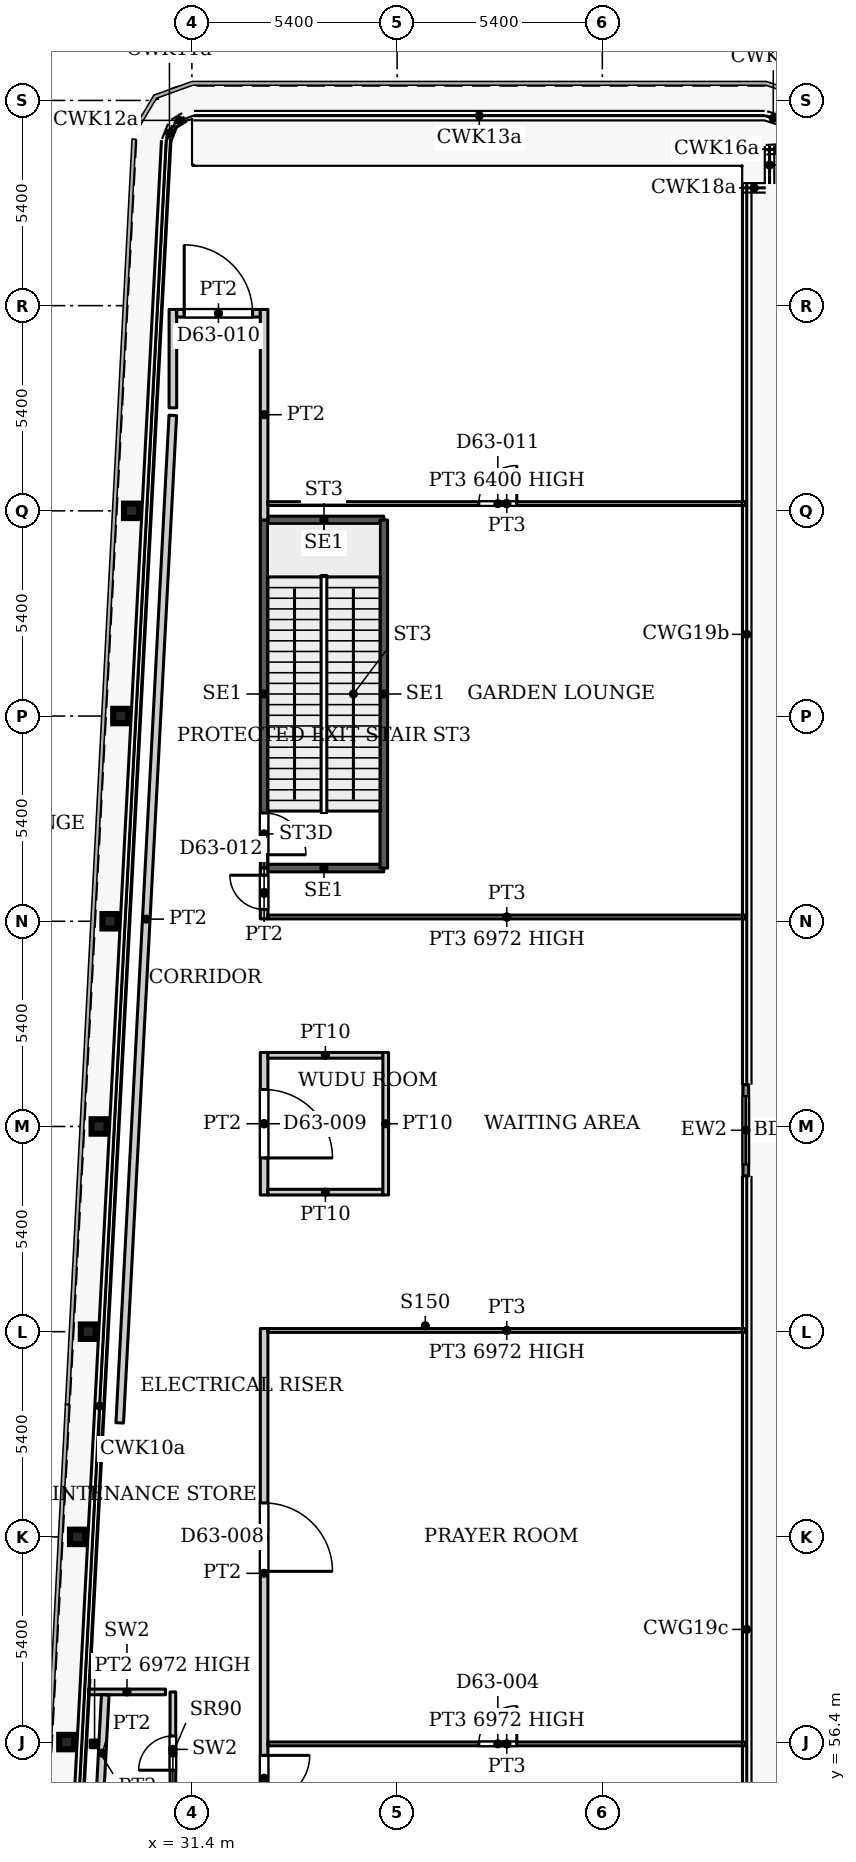
"""IFC4 building model, lengths in metres.
Left out: names, types, materials, properties, quantities, classifications, styles, units other than length and angle.
Written with IfcOpenShell. Run it as: python <this file> out.ifc"""

import sys

from ifc_helpers import new_model, si_unit, direction, frame, frame_2d, origin, origin_2d, place, context, subcontext, project, spatial, rectangle, i_section, extrude, source, transform, mapped, element, fill, save


model = new_model("IFC4")
c1 = context("Model", 3, precision=1e-05, world=origin(), true_north=direction((0.0, 1.0)))
c2 = subcontext(c1, "Body", "Model", "MODEL_VIEW")
j1 = project(units=[si_unit("LENGTHUNIT", "METRE"), si_unit("PLANEANGLEUNIT", "RADIAN")], contexts=[c1])
p1 = place(None, origin())
s1 = spatial("IfcSite", under=j1, at=p1, CompositionType="ELEMENT")
p2 = place(p1, origin())
s2 = spatial("IfcBuilding", under=s1, at=p2, CompositionType="ELEMENT")
p3 = place(p2, frame((0.0, 0.0, 266.9)))
s3 = spatial("IfcBuildingStorey", under=s2, at=p3, CompositionType="ELEMENT", Elevation=266.9)
for number, where, z_axis, x_axis in (
    (1, (28.106, 56.4, 0.0), (0.0, 0.0, 1.0), (1.0, 0.0, 0.0)),
    (2, (28.39, 61.8, 0.0), (0.0, 0.0, 1.0), (1.0, 0.0, 0.0)),
    (3, (28.674, 67.2, 0.0), (0.0, 0.0, 1.0), (1.0, 0.0, 0.0)),
    (4, (28.958, 72.6, 0.0), (0.0, 0.0, 1.0), (1.0, 0.0, 0.0)),
    (5, (29.243, 78.0, 0.0), (0.0, 0.0, 1.0), (1.0, 0.0, 0.0)),
    (6, (29.527, 83.4, 0.0), (0.0, 0.0, 1.0), (1.0, 0.0, 0.0)),
    (7, (29.811, 88.8, 0.0), (0.0, 0.0, 1.0), (1.0, 0.0, 0.0)),
):
    element("IfcColumn", number, at=place(p3, frame(where, z_axis=z_axis, x_axis=x_axis)), inside=s3, PredefinedType="COLUMN", context=c2, shape_type="SweptSolid", body=[
        extrude(i_section(OverallWidth=0.395, OverallDepth=0.38, WebThickness=0.019, FlangeThickness=0.03, FilletRadius=0.011, at=origin_2d()), origin(), (0.0, 0.0, 1.0), 7.8),
    ])
p4 = place(p3, frame((45.975, 73.7, 0.0), z_axis=(0.0, 0.0, 1.0), x_axis=(0.0, -1.0, 0.0)))
e8 = element("IfcWall", 8, at=p4, inside=s3, PredefinedType="SOLIDWALL", context=c2, shape_type="SweptSolid", body=[
    extrude(rectangle(XDim=2.4, YDim=0.15, at=frame_2d((1.2, 0.0))), origin(), (0.0, 0.0, 1.0), 7.65),
])
p5 = place(p4, frame((0.3, 0.0, 0.0)))
e9 = element("IfcOpeningElement", 9, at=p5, cuts=e8, PredefinedType="OPENING", context=c2, shape_type="SweptSolid", body=[
    extrude(rectangle(XDim=1.8, YDim=2.4, at=frame_2d((0.9, 1.2))), frame((0.0, 0.085, 0.0), z_axis=(0.0, -1.0, 0.0), x_axis=(1.0, 0.0, 0.0)), (0.0, 0.0, 1.0), 0.17),
])
for number, where, z_axis, x_axis in (
    (10, (33.3, 79.4, 0.0), (0.0, 0.0, 1.0), (1.0, 0.0, 0.0)),
    (11, (33.3, 88.56, 0.0), (0.0, 0.0, 1.0), (1.0, 0.0, 0.0)),
):
    element("IfcWall", number, at=place(p3, frame(where, z_axis=z_axis, x_axis=x_axis)), inside=s3, PredefinedType="SHEAR", context=c2, shape_type="SweptSolid", body=[
        extrude(rectangle(XDim=3.15, YDim=0.2, at=frame_2d((1.575, 0.0))), origin(), (0.0, 0.0, 1.0), 7.8),
    ])
p6 = place(p3, frame((33.3, 79.4, 0.0), z_axis=(0.0, 0.0, 1.0), x_axis=(0.0, 1.0, 0.0)))
e12 = element("IfcWall", 12, at=p6, inside=s3, PredefinedType="SHEAR", context=c2, shape_type="SweptSolid", body=[
    extrude(rectangle(XDim=9.16, YDim=0.2, at=frame_2d((4.58, 0.0))), origin(), (0.0, 0.0, 1.0), 7.8),
])
p7 = place(p6, frame((0.35, 0.0, 0.0)))
e13 = element("IfcOpeningElement", 13, at=p7, cuts=e12, PredefinedType="OPENING", context=c2, shape_type="SweptSolid", body=[
    extrude(rectangle(XDim=1.1, YDim=2.2, at=frame_2d((0.55, 1.1))), frame((0.0, 0.11, 0.0), z_axis=(0.0, -1.0, 0.0), x_axis=(1.0, 0.0, 0.0)), (0.0, 0.0, 1.0), 0.22),
])
p8 = place(p3, frame((36.45, 79.4, 0.0), z_axis=(0.0, 0.0, 1.0), x_axis=(0.0, 1.0, 0.0)))
e14 = element("IfcWall", 14, at=p8, inside=s3, PredefinedType="SHEAR", context=c2, shape_type="SweptSolid", body=[
    extrude(rectangle(XDim=9.16, YDim=0.2, at=frame_2d((4.58, 0.0))), origin(), (0.0, 0.0, 1.0), 7.8),
])
p9 = place(p3, frame((30.9, 54.695, 0.0), z_axis=(0.0, 0.0, 1.0), x_axis=(0.0, 1.0, 0.0)))
e15 = element("IfcWall", 15, at=p9, inside=s3, PredefinedType="PARTITIONING", context=c2, shape_type="SweptSolid", body=[
    extrude(rectangle(XDim=3.025, YDim=0.15, at=frame_2d((1.512, 0.0))), origin(), (0.0, 0.0, 1.0), 6.972),
])
p10 = place(p9, frame((0.965, 0.0, 0.0)))
e16 = element("IfcOpeningElement", 16, at=p10, cuts=e15, PredefinedType="OPENING", context=c2, shape_type="SweptSolid", body=[
    extrude(rectangle(XDim=0.9, YDim=2.2, at=frame_2d((0.45, 1.1))), frame((0.0, 0.085, 0.0), z_axis=(0.0, -1.0, 0.0), x_axis=(1.0, 0.0, 0.0)), (0.0, 0.0, 1.0), 0.17),
])
p11 = place(p3, frame((28.678, 57.72, 0.0), z_axis=(0.0, 0.0, 1.0), x_axis=(1.0, 0.0, 0.0)))
e17 = element("IfcWall", 17, at=p11, inside=s3, PredefinedType="PARTITIONING", context=c2, shape_type="SweptSolid", body=[
    extrude(rectangle(XDim=2.027, YDim=0.15, at=frame_2d((1.014, 0.0))), origin(), (0.0, 0.0, 1.0), 7.8),
])
p12 = place(p3, frame((28.724, 56.353, 0.0), z_axis=(0.0, 0.0, 1.0), x_axis=(1.0, 0.0, 0.0)))
e18 = element("IfcWall", 18, at=p12, inside=s3, PredefinedType="PARTITIONING", context=c2, shape_type="SweptSolid", body=[
    extrude(rectangle(XDim=0.23, YDim=0.2, at=frame_2d((0.115, 0.0))), origin(), (0.0, 0.0, 1.0), 6.972),
])
p13 = place(p3, frame((28.96, 54.574, 0.0), z_axis=(0.0, 0.0, 1.0), x_axis=(0.052145785312, 0.998639483034, 0.0)))
e19 = element("IfcWall", 19, at=p13, inside=s3, PredefinedType="PARTITIONING", context=c2, shape_type="SweptSolid", body=[
    extrude(rectangle(XDim=3.071, YDim=0.2, at=frame_2d((1.536, 0.0))), origin(), (0.0, 0.0, 1.0), 7.5),
])
p14 = place(p3, frame((29.501, 64.8, 0.0), z_axis=(0.0, 0.0, 1.0), x_axis=(0.052619165502, 0.998614652117, 0.0)))
e20 = element("IfcWall", 20, at=p14, inside=s3, PredefinedType="PARTITIONING", context=c2, shape_type="SweptSolid", body=[
    extrude(rectangle(XDim=26.549, YDim=0.2, at=frame_2d((13.274, 0.0))), origin(), (0.0, 0.0, 1.0), 7.5),
])
p15 = place(p3, frame((30.9, 91.512, 0.0), z_axis=(0.0, 0.0, 1.0), x_axis=(0.0, 1.0, 0.0)))
e21 = element("IfcWall", 21, at=p15, inside=s3, PredefinedType="PARTITIONING", context=c2, shape_type="SweptSolid", body=[
    extrude(rectangle(XDim=2.588, YDim=0.2, at=frame_2d((1.294, 0.0))), origin(), (0.0, 0.0, 1.0), 7.5),
])
p16 = place(p3, frame((31.0, 94.0, 0.0), z_axis=(0.0, 0.0, 1.0), x_axis=(1.0, 0.0, 0.0)))
e22 = element("IfcWall", 22, at=p16, inside=s3, PredefinedType="PARTITIONING", context=c2, shape_type="SweptSolid", body=[
    extrude(rectangle(XDim=2.2, YDim=0.2, at=frame_2d((1.1, 0.0))), origin(), (0.0, 0.0, 1.0), 7.5),
])
p17 = place(p16, frame((0.198, 0.0, 0.0)))
e23 = element("IfcOpeningElement", 23, at=p17, cuts=e22, PredefinedType="OPENING", context=c2, shape_type="SweptSolid", body=[
    extrude(rectangle(XDim=1.8, YDim=2.1, at=frame_2d((0.9, 1.05))), frame((0.0, 0.11, 0.0), z_axis=(0.0, -1.0, 0.0), x_axis=(1.0, 0.0, 0.0)), (0.0, 0.0, 1.0), 0.22),
])
p18 = place(p3, frame((33.3, 54.4, 0.0), z_axis=(0.0, 0.0, 1.0), x_axis=(0.0, 1.0, 0.0)))
e24 = element("IfcWall", 24, at=p18, inside=s3, PredefinedType="PARTITIONING", context=c2, shape_type="SweptSolid", body=[
    extrude(rectangle(XDim=12.882, YDim=0.2, at=frame_2d((6.441, 0.0))), origin(), (0.0, 0.0, 1.0), 7.5),
])
p19 = place(p18, frame((0.45, 0.0, 0.0)))
e25 = element("IfcOpeningElement", 25, at=p19, cuts=e24, PredefinedType="OPENING", context=c2, shape_type="SweptSolid", body=[
    extrude(rectangle(XDim=1.2, YDim=2.1, at=frame_2d((0.6, 1.05))), frame((0.0, 0.11, 0.0), z_axis=(0.0, -1.0, 0.0), x_axis=(1.0, 0.0, 0.0)), (0.0, 0.0, 1.0), 0.22),
])
p20 = place(p18, frame((6.493, 0.0, 0.0)))
e26 = element("IfcOpeningElement", 26, at=p20, cuts=e24, PredefinedType="OPENING", context=c2, shape_type="SweptSolid", body=[
    extrude(rectangle(XDim=1.8, YDim=2.1, at=frame_2d((0.9, 1.05))), frame((0.0, 0.11, 0.0), z_axis=(0.0, -1.0, 0.0), x_axis=(1.0, 0.0, 0.0)), (0.0, 0.0, 1.0), 0.22),
])
p21 = place(p3, frame((33.3, 70.797, 0.0), z_axis=(0.0, 0.0, 1.0), x_axis=(0.0, 1.0, 0.0)))
e27 = element("IfcWall", 27, at=p21, inside=s3, PredefinedType="PARTITIONING", context=c2, shape_type="SweptSolid", body=[
    extrude(rectangle(XDim=3.75, YDim=0.2, at=frame_2d((1.875, 0.0))), origin(), (0.0, 0.0, 1.0), 7.5),
])
p22 = place(p21, frame((0.975, 0.0, 0.0)))
e28 = element("IfcOpeningElement", 28, at=p22, cuts=e27, PredefinedType="OPENING", context=c2, shape_type="SweptSolid", body=[
    extrude(rectangle(XDim=1.8, YDim=2.1, at=frame_2d((0.9, 1.05))), frame((0.0, 0.11, 0.0), z_axis=(0.0, -1.0, 0.0), x_axis=(1.0, 0.0, 0.0)), (0.0, 0.0, 1.0), 0.22),
])
p23 = place(p3, frame((33.3, 78.062, 0.0), z_axis=(0.0, 0.0, 1.0), x_axis=(0.0, 1.0, 0.0)))
e29 = element("IfcWall", 29, at=p23, inside=s3, PredefinedType="PARTITIONING", context=c2, shape_type="SweptSolid", body=[
    extrude(rectangle(XDim=1.338, YDim=0.2, at=frame_2d((0.669, 0.0))), origin(), (0.0, 0.0, 1.0), 7.5),
])
p24 = place(p23, frame((0.25, 0.0, 0.0)))
e30 = element("IfcOpeningElement", 30, at=p24, cuts=e29, PredefinedType="OPENING", context=c2, shape_type="SweptSolid", body=[
    extrude(rectangle(XDim=0.9, YDim=2.1, at=frame_2d((0.45, 1.05))), frame((0.0, 0.11, 0.0), z_axis=(0.0, -1.0, 0.0), x_axis=(1.0, 0.0, 0.0)), (0.0, 0.0, 1.0), 0.22),
])
p25 = place(p3, frame((33.3, 88.56, 0.0), z_axis=(0.0, 0.0, 1.0), x_axis=(0.0, 1.0, 0.0)))
e31 = element("IfcWall", 31, at=p25, inside=s3, PredefinedType="PARTITIONING", context=c2, shape_type="SweptSolid", body=[
    extrude(rectangle(XDim=5.54, YDim=0.2, at=frame_2d((2.77, 0.0))), origin(), (0.0, 0.0, 1.0), 7.5),
])
p26 = place(p3, frame((33.4, 56.353, 0.0), z_axis=(0.0, 0.0, 1.0), x_axis=(1.0, 0.0, 0.0)))
e32 = element("IfcWall", 32, at=p26, inside=s3, PredefinedType="PARTITIONING", context=c2, shape_type="SweptSolid", body=[
    extrude(rectangle(XDim=12.57, YDim=0.1, at=frame_2d((6.285, 0.0))), origin(), (0.0, 0.0, 1.0), 6.972),
])
p27 = place(p26, frame((5.55, 0.0, 0.0)))
e33 = element("IfcOpeningElement", 33, at=p27, cuts=e32, PredefinedType="OPENING", context=c2, shape_type="SweptSolid", body=[
    extrude(rectangle(XDim=1.0, YDim=2.1, at=frame_2d((0.5, 1.05))), frame((0.0, 0.06, 0.0), z_axis=(0.0, -1.0, 0.0), x_axis=(1.0, 0.0, 0.0)), (0.0, 0.0, 1.0), 0.12),
])
p28 = place(p3, frame((33.4, 67.232, 0.0), z_axis=(0.0, 0.0, 1.0), x_axis=(1.0, 0.0, 0.0)))
e34 = element("IfcWall", 34, at=p28, inside=s3, PredefinedType="PARTITIONING", context=c2, shape_type="SweptSolid", body=[
    extrude(rectangle(XDim=12.57, YDim=0.1, at=frame_2d((6.285, 0.0))), origin(), (0.0, 0.0, 1.0), 6.972),
])
for number, where, z_axis, x_axis in (
    (35, (33.4, 70.872, 0.0), (0.0, 0.0, 1.0), (1.0, 0.0, 0.0)),
    (36, (33.4, 74.472, 0.0), (0.0, 0.0, 1.0), (1.0, 0.0, 0.0)),
):
    element("IfcWall", number, at=place(p3, frame(where, z_axis=z_axis, x_axis=x_axis)), inside=s3, PredefinedType="PARTITIONING", context=c2, shape_type="SweptSolid", body=[
        extrude(rectangle(XDim=3.025, YDim=0.15, at=frame_2d((1.513, 0.0))), origin(), (0.0, 0.0, 1.0), 7.5),
    ])
p29 = place(p3, frame((33.4, 78.112, 0.0), z_axis=(0.0, 0.0, 1.0), x_axis=(1.0, 0.0, 0.0)))
e37 = element("IfcWall", 37, at=p29, inside=s3, PredefinedType="PARTITIONING", context=c2, shape_type="SweptSolid", body=[
    extrude(rectangle(XDim=12.57, YDim=0.1, at=frame_2d((6.285, 0.0))), origin(), (0.0, 0.0, 1.0), 6.972),
])
p30 = place(p3, frame((33.4, 88.991, 0.0), z_axis=(0.0, 0.0, 1.0), x_axis=(1.0, 0.0, 0.0)))
e38 = element("IfcWall", 38, at=p30, inside=s3, PredefinedType="PARTITIONING", context=c2, shape_type="SweptSolid", body=[
    extrude(rectangle(XDim=12.57, YDim=0.1, at=frame_2d((6.285, 0.0))), origin(), (0.0, 0.0, 1.0), 6.4),
])
p31 = place(p30, frame((5.55, 0.0, 0.0)))
e39 = element("IfcOpeningElement", 39, at=p31, cuts=e38, PredefinedType="OPENING", context=c2, shape_type="SweptSolid", body=[
    extrude(rectangle(XDim=1.0, YDim=2.1, at=frame_2d((0.5, 1.05))), frame((0.0, 0.06, 0.0), z_axis=(0.0, -1.0, 0.0), x_axis=(1.0, 0.0, 0.0)), (0.0, 0.0, 1.0), 0.12),
])
p32 = place(p3, frame((36.5, 70.797, 0.0), z_axis=(0.0, 0.0, 1.0), x_axis=(0.0, 1.0, 0.0)))
e40 = element("IfcWall", 40, at=p32, inside=s3, PredefinedType="PARTITIONING", context=c2, shape_type="SweptSolid", body=[
    extrude(rectangle(XDim=3.75, YDim=0.15, at=frame_2d((1.875, 0.0))), origin(), (0.0, 0.0, 1.0), 7.5),
])
m1 = source(origin(), c2, "Body", "SweptSolid", [
    extrude(rectangle(XDim=1.8, YDim=2.4, at=frame_2d((0.9, 1.2))), frame((0.0, 0.025, 0.0), z_axis=(0.0, -1.0, 0.0), x_axis=(1.0, 0.0, 0.0)), (0.0, 0.0, 1.0), 0.05),
])
p33 = place(p5, origin())
e41 = element("IfcDoor", 41, at=p33, inside=s3, OperationType="SLIDING_TO_LEFT", PredefinedType="DOOR", context=c2, shape_type="MappedRepresentation", body=[
    mapped(m1, transform((0.0, 0.0, 0.0), x_axis=(1.0, 0.0, 0.0), y_axis=(0.0, 1.0, 0.0), z_axis=(0.0, 0.0, 1.0), scale=1.0)),
])
fill(e9, e41)
m2 = source(origin(), c2, "Body", "SweptSolid", [
    extrude(rectangle(XDim=0.9, YDim=2.2, at=frame_2d((0.45, 1.1))), frame((0.0, 0.025, 0.0), z_axis=(0.0, -1.0, 0.0), x_axis=(1.0, 0.0, 0.0)), (0.0, 0.0, 1.0), 0.05),
])
p34 = place(p10, origin())
e42 = element("IfcDoor", 42, at=p34, inside=s3, OperationType="SINGLE_SWING_LEFT", PredefinedType="DOOR", context=c2, shape_type="MappedRepresentation", body=[
    mapped(m2, transform((0.0, 0.0, 0.0), x_axis=(1.0, 0.0, 0.0), y_axis=(0.0, 1.0, 0.0), z_axis=(0.0, 0.0, 1.0), scale=1.0)),
])
fill(e16, e42)
m3 = source(origin(), c2, "Body", "SweptSolid", [
    extrude(rectangle(XDim=1.1, YDim=2.2, at=frame_2d((0.55, 1.1))), frame((0.0, 0.025, 0.0), z_axis=(0.0, -1.0, 0.0), x_axis=(1.0, 0.0, 0.0)), (0.0, 0.0, 1.0), 0.05),
])
p35 = place(p7, origin())
e43 = element("IfcDoor", 43, at=p35, inside=s3, OperationType="SINGLE_SWING_RIGHT", PredefinedType="DOOR", context=c2, shape_type="MappedRepresentation", body=[
    mapped(m3, transform((0.0, 0.0, 0.0), x_axis=(1.0, 0.0, 0.0), y_axis=(0.0, 1.0, 0.0), z_axis=(0.0, 0.0, 1.0), scale=1.0)),
])
fill(e13, e43)
m4 = source(origin(), c2, "Body", "SweptSolid", [
    extrude(rectangle(XDim=1.0, YDim=2.1, at=frame_2d((0.5, 1.05))), frame((0.0, 0.025, 0.0), z_axis=(0.0, -1.0, 0.0), x_axis=(1.0, 0.0, 0.0)), (0.0, 0.0, 1.0), 0.05),
])
p36 = place(p27, origin())
e44 = element("IfcDoor", 44, at=p36, inside=s3, OperationType="SINGLE_SWING_LEFT", PredefinedType="DOOR", context=c2, shape_type="MappedRepresentation", body=[
    mapped(m4, transform((0.0, 0.0, 0.0), x_axis=(1.0, 0.0, 0.0), y_axis=(0.0, 1.0, 0.0), z_axis=(0.0, 0.0, 1.0), scale=1.0)),
])
fill(e33, e44)
m5 = source(origin(), c2, "Body", "SweptSolid", [
    extrude(rectangle(XDim=1.2, YDim=2.1, at=frame_2d((0.6, 1.05))), frame((0.0, 0.025, 0.0), z_axis=(0.0, -1.0, 0.0), x_axis=(1.0, 0.0, 0.0)), (0.0, 0.0, 1.0), 0.05),
])
p37 = place(p19, origin())
e45 = element("IfcDoor", 45, at=p37, inside=s3, OperationType="SINGLE_SWING_RIGHT", PredefinedType="DOOR", context=c2, shape_type="MappedRepresentation", body=[
    mapped(m5, transform((0.0, 0.0, 0.0), x_axis=(1.0, 0.0, 0.0), y_axis=(0.0, 1.0, 0.0), z_axis=(0.0, 0.0, 1.0), scale=1.0)),
])
fill(e25, e45)
m6 = source(origin(), c2, "Body", "SweptSolid", [
    extrude(rectangle(XDim=1.8, YDim=2.1, at=frame_2d((0.9, 1.05))), frame((0.0, 0.025, 0.0), z_axis=(0.0, -1.0, 0.0), x_axis=(1.0, 0.0, 0.0)), (0.0, 0.0, 1.0), 0.05),
])
p38 = place(p20, origin())
e46 = element("IfcDoor", 46, at=p38, inside=s3, OperationType="DOUBLE_DOOR_SINGLE_SWING", PredefinedType="DOOR", context=c2, shape_type="MappedRepresentation", body=[
    mapped(m6, transform((0.0, 0.0, 0.0), x_axis=(1.0, 0.0, 0.0), y_axis=(0.0, 1.0, 0.0), z_axis=(0.0, 0.0, 1.0), scale=1.0)),
])
fill(e26, e46)
p39 = place(p22, origin())
e47 = element("IfcDoor", 47, at=p39, inside=s3, OperationType="DOUBLE_DOOR_SINGLE_SWING", PredefinedType="DOOR", context=c2, shape_type="MappedRepresentation", body=[
    mapped(m6, transform((0.0, 0.0, 0.0), x_axis=(1.0, 0.0, 0.0), y_axis=(0.0, 1.0, 0.0), z_axis=(0.0, 0.0, 1.0), scale=1.0)),
])
fill(e28, e47)
p40 = place(p17, origin())
e48 = element("IfcDoor", 48, at=p40, inside=s3, OperationType="DOUBLE_DOOR_SINGLE_SWING", PredefinedType="DOOR", context=c2, shape_type="MappedRepresentation", body=[
    mapped(m6, transform((0.0, 0.0, 0.0), x_axis=(1.0, 0.0, 0.0), y_axis=(0.0, 1.0, 0.0), z_axis=(0.0, 0.0, 1.0), scale=1.0)),
])
fill(e23, e48)
p41 = place(p31, origin())
e49 = element("IfcDoor", 49, at=p41, inside=s3, OperationType="SINGLE_SWING_LEFT", PredefinedType="DOOR", context=c2, shape_type="MappedRepresentation", body=[
    mapped(m4, transform((0.0, 0.0, 0.0), x_axis=(1.0, 0.0, 0.0), y_axis=(0.0, 1.0, 0.0), z_axis=(0.0, 0.0, 1.0), scale=1.0)),
])
fill(e39, e49)
m7 = source(origin(), c2, "Body", "SweptSolid", [
    extrude(rectangle(XDim=0.9, YDim=2.1, at=frame_2d((0.45, 1.05))), frame((0.0, 0.025, 0.0), z_axis=(0.0, -1.0, 0.0), x_axis=(1.0, 0.0, 0.0)), (0.0, 0.0, 1.0), 0.05),
])
p42 = place(p24, origin())
e50 = element("IfcDoor", 50, at=p42, inside=s3, OperationType="SINGLE_SWING_LEFT", PredefinedType="DOOR", context=c2, shape_type="MappedRepresentation", body=[
    mapped(m7, transform((0.0, 0.0, 0.0), x_axis=(1.0, 0.0, 0.0), y_axis=(0.0, 1.0, 0.0), z_axis=(0.0, 0.0, 1.0), scale=1.0)),
])
fill(e30, e50)
save(model, sys.argv[1])
